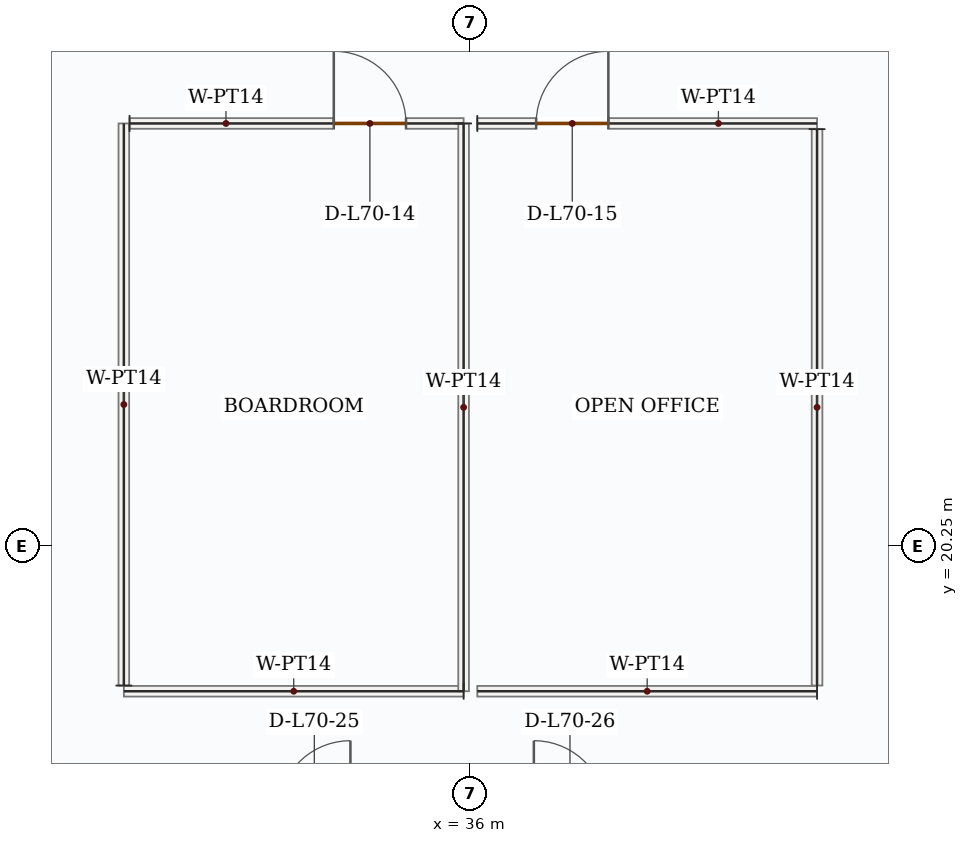
"""IFC4 building model, lengths in metres.
Left out: names, types, materials, properties, quantities, classifications, styles, units other than length and angle.
Written with IfcOpenShell. Run it as: python <this file> out.ifc"""

import sys

from ifc_helpers import new_model, si_unit, direction, frame, frame_2d, origin, place, context, subcontext, project, spatial, rectangle, extrude, source, transform, mapped, element, fill, save


model = new_model("IFC4")
c1 = context("Model", 3, precision=1e-05, world=origin(), true_north=direction((0.0, 1.0)))
c2 = subcontext(c1, "Body", "Model", "MODEL_VIEW")
j1 = project(units=[si_unit("LENGTHUNIT", "METRE"), si_unit("PLANEANGLEUNIT", "RADIAN")], contexts=[c1])
p1 = place(None, origin())
s1 = spatial("IfcSite", under=j1, at=p1, CompositionType="ELEMENT")
p2 = place(p1, origin())
s2 = spatial("IfcBuilding", under=s1, at=p2, CompositionType="ELEMENT")
p3 = place(p2, frame((0.0, 0.0, 291.6)))
s3 = spatial("IfcBuildingStorey", under=s2, at=p3, CompositionType="ELEMENT", Elevation=291.6)
m1 = source(origin(), c2, "Body", "SweptSolid", [
    extrude(rectangle(XDim=4.47, YDim=0.14, at=frame_2d((2.235, 0.0))), origin(), (0.0, 0.0, 1.0), 3.5),
])
p4 = place(p3, frame((35.91, 18.34, 0.0), z_axis=(0.0, 0.0, 1.0), x_axis=(-1.0, 0.0, 0.0)))
e1 = element("IfcWall", 1, at=p4, inside=s3, PredefinedType="PARTITIONING", context=c2, shape_type="MappedRepresentation", body=[
    mapped(m1, transform((0.0, 0.0, 0.0), x_axis=(1.0, 0.0, 0.0), y_axis=(0.0, 1.0, 0.0), z_axis=(0.0, 0.0, 1.0), scale=1.0)),
])
m2 = source(origin(), c2, "Body", "SweptSolid", [
    extrude(rectangle(XDim=7.395, YDim=0.14, at=frame_2d((3.698, 0.0))), origin(), (0.0, 0.0, 1.0), 3.5),
])
p5 = place(p3, frame((31.44, 18.415, 0.0), z_axis=(0.0, 0.0, 1.0), x_axis=(0.0, 1.0, 0.0)))
e2 = element("IfcWall", 2, at=p5, inside=s3, PredefinedType="PARTITIONING", context=c2, shape_type="MappedRepresentation", body=[
    mapped(m2, transform((0.0, 0.0, 0.0), x_axis=(1.0, 0.0, 0.0), y_axis=(0.0, 1.0, 0.0), z_axis=(0.0, 0.0, 1.0), scale=1.0)),
])
p6 = place(p3, frame((31.515, 25.81, 0.0), z_axis=(0.0, 0.0, 1.0), x_axis=(1.0, 0.0, 0.0)))
e3 = element("IfcWall", 3, at=p6, inside=s3, PredefinedType="PARTITIONING", context=c2, shape_type="SweptSolid", body=[
    extrude(rectangle(XDim=4.395, YDim=0.14, at=frame_2d((2.198, 0.0))), origin(), (0.0, 0.0, 1.0), 3.5),
])
p7 = place(p6, frame((2.687, 0.0, 0.0)))
e4 = element("IfcOpeningElement", 4, at=p7, cuts=e3, PredefinedType="OPENING", context=c2, shape_type="SweptSolid", body=[
    extrude(rectangle(XDim=0.95, YDim=2.15, at=frame_2d((0.475, 1.075))), frame((0.0, 0.08, 0.0), z_axis=(0.0, -1.0, 0.0), x_axis=(1.0, 0.0, 0.0)), (0.0, 0.0, 1.0), 0.16),
])
m3 = source(origin(), c2, "Body", "SweptSolid", [
    extrude(rectangle(XDim=7.47, YDim=0.14, at=frame_2d((3.735, 0.0))), origin(), (0.0, 0.0, 1.0), 3.5),
])
p8 = place(p3, frame((35.91, 25.81, 0.0), z_axis=(0.0, 0.0, 1.0), x_axis=(0.0, -1.0, 0.0)))
e5 = element("IfcWall", 5, at=p8, inside=s3, PredefinedType="PARTITIONING", context=c2, shape_type="MappedRepresentation", body=[
    mapped(m3, transform((0.0, 0.0, 0.0), x_axis=(1.0, 0.0, 0.0), y_axis=(0.0, 1.0, 0.0), z_axis=(0.0, 0.0, 1.0), scale=1.0)),
])
p9 = place(p3, frame((40.56, 18.34, 0.0), z_axis=(0.0, 0.0, 1.0), x_axis=(-1.0, 0.0, 0.0)))
e6 = element("IfcWall", 6, at=p9, inside=s3, PredefinedType="PARTITIONING", context=c2, shape_type="MappedRepresentation", body=[
    mapped(m1, transform((0.0, 0.0, 0.0), x_axis=(1.0, 0.0, 0.0), y_axis=(0.0, 1.0, 0.0), z_axis=(0.0, 0.0, 1.0), scale=1.0)),
])
p10 = place(p3, frame((36.09, 25.81, 0.0), z_axis=(0.0, 0.0, 1.0), x_axis=(1.0, 0.0, 0.0)))
e7 = element("IfcWall", 7, at=p10, inside=s3, PredefinedType="PARTITIONING", context=c2, shape_type="SweptSolid", body=[
    extrude(rectangle(XDim=4.47, YDim=0.14, at=frame_2d((2.235, 0.0))), origin(), (0.0, 0.0, 1.0), 3.5),
])
p11 = place(p10, frame((0.774, 0.0, 0.0)))
e8 = element("IfcOpeningElement", 8, at=p11, cuts=e7, PredefinedType="OPENING", context=c2, shape_type="SweptSolid", body=[
    extrude(rectangle(XDim=0.95, YDim=2.15, at=frame_2d((0.475, 1.075))), frame((0.0, 0.08, 0.0), z_axis=(0.0, -1.0, 0.0), x_axis=(1.0, 0.0, 0.0)), (0.0, 0.0, 1.0), 0.16),
])
m4 = source(origin(), c2, "Body", "SweptSolid", [
    extrude(rectangle(XDim=7.32, YDim=0.14, at=frame_2d((3.66, 0.0))), origin(), (0.0, 0.0, 1.0), 3.5),
])
p12 = place(p3, frame((40.56, 25.735, 0.0), z_axis=(0.0, 0.0, 1.0), x_axis=(0.0, -1.0, 0.0)))
e9 = element("IfcWall", 9, at=p12, inside=s3, PredefinedType="PARTITIONING", context=c2, shape_type="MappedRepresentation", body=[
    mapped(m4, transform((0.0, 0.0, 0.0), x_axis=(1.0, 0.0, 0.0), y_axis=(0.0, 1.0, 0.0), z_axis=(0.0, 0.0, 1.0), scale=1.0)),
])
m5 = source(origin(), c2, "Body", "SweptSolid", [
    extrude(rectangle(XDim=0.95, YDim=2.15, at=frame_2d((0.475, 1.075))), frame((0.0, 0.025, 0.0), z_axis=(0.0, -1.0, 0.0), x_axis=(1.0, 0.0, 0.0)), (0.0, 0.0, 1.0), 0.05),
])
p13 = place(p7, origin())
e10 = element("IfcDoor", 10, at=p13, inside=s3, OperationType="SINGLE_SWING_LEFT", PredefinedType="DOOR", context=c2, shape_type="MappedRepresentation", body=[
    mapped(m5, transform((0.0, 0.0, 0.0), x_axis=(1.0, 0.0, 0.0), y_axis=(0.0, 1.0, 0.0), z_axis=(0.0, 0.0, 1.0), scale=1.0)),
])
fill(e4, e10)
p14 = place(p11, origin())
e11 = element("IfcDoor", 11, at=p14, inside=s3, OperationType="SINGLE_SWING_RIGHT", PredefinedType="DOOR", context=c2, shape_type="MappedRepresentation", body=[
    mapped(m5, transform((0.0, 0.0, 0.0), x_axis=(1.0, 0.0, 0.0), y_axis=(0.0, 1.0, 0.0), z_axis=(0.0, 0.0, 1.0), scale=1.0)),
])
fill(e8, e11)
save(model, sys.argv[1])
